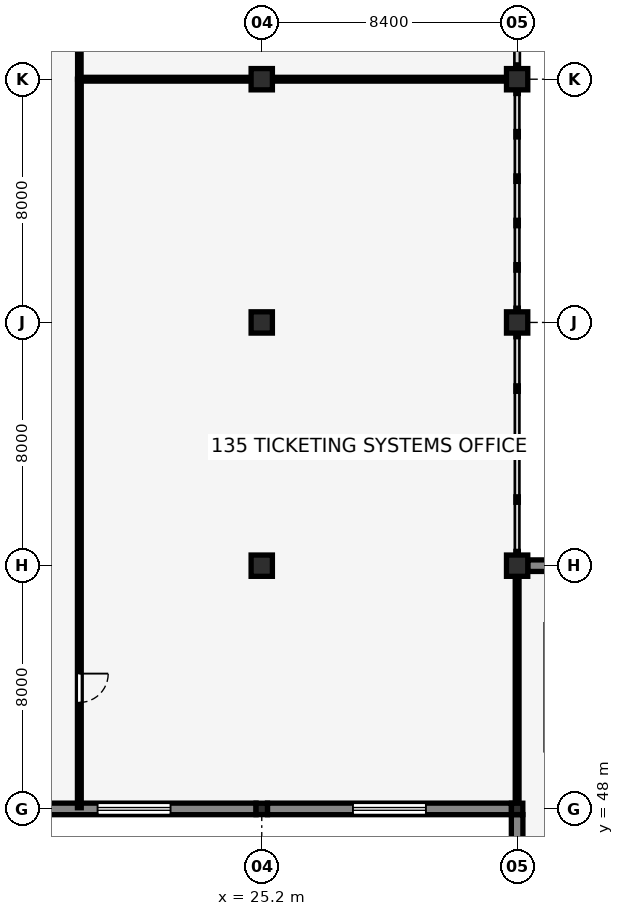
"""IFC4 building model, lengths in metres.
Left out: names, types, materials, properties, quantities, classifications, styles, units other than length and angle.
Written with IfcOpenShell. Run it as: python <this file> out.ifc"""

import sys

from ifc_helpers import new_model, si_unit, direction, frame, frame_2d, origin, origin_2d, place, context, subcontext, project, spatial, rectangle, i_section, extrude, element, fill, save


model = new_model("IFC4")
c1 = context("Model", 3, precision=1e-05, world=origin(), true_north=direction((0.0, 1.0)))
c2 = subcontext(c1, "Body", "Model", "MODEL_VIEW")
j1 = project(units=[si_unit("LENGTHUNIT", "METRE"), si_unit("PLANEANGLEUNIT", "RADIAN")], contexts=[c1])
p1 = place(None, origin())
s1 = spatial("IfcSite", under=j1, at=p1, CompositionType="ELEMENT")
p2 = place(p1, origin())
s2 = spatial("IfcBuilding", under=s1, at=p2, CompositionType="ELEMENT")
p3 = place(p2, frame((0.0, 0.0, 5.44)))
s3 = spatial("IfcBuildingStorey", under=s2, at=p3, CompositionType="ELEMENT", Elevation=5.44)
p4 = place(p3, frame((25.2, 48.0, 0.0), z_axis=(0.0, 0.0, 1.0), x_axis=(1.0, 0.0, 0.0)))
e1 = element("IfcColumn", 1, at=p4, inside=s3, PredefinedType="COLUMN", context=c2, shape_type="SweptSolid", body=[
    extrude(i_section(OverallWidth=0.375, OverallDepth=0.375, WebThickness=0.017, FlangeThickness=0.027, FilletRadius=0.015, at=origin_2d()), origin(), (0.0, 0.0, 1.0), 3.8),
])
for number, where, z_axis, x_axis in (
    (2, (25.2, 56.0, 0.0), (0.0, 0.0, 1.0), (1.0, 0.0, 0.0)),
    (3, (25.2, 64.0, 0.0), (0.0, 0.0, 1.0), (1.0, 0.0, 0.0)),
    (4, (25.2, 72.0, 0.0), (0.0, 0.0, 1.0), (1.0, 0.0, 0.0)),
):
    element("IfcColumn", number, at=place(p3, frame(where, z_axis=z_axis, x_axis=x_axis)), inside=s3, PredefinedType="COLUMN", context=c2, shape_type="SweptSolid", body=[
        extrude(rectangle(XDim=0.7, YDim=0.7, at=origin_2d()), origin(), (0.0, 0.0, 1.0), 3.8),
    ])
p5 = place(p3, frame((33.6, 48.0, 0.0), z_axis=(0.0, 0.0, 1.0), x_axis=(1.0, 0.0, 0.0)))
e5 = element("IfcColumn", 5, at=p5, inside=s3, PredefinedType="COLUMN", context=c2, shape_type="SweptSolid", body=[
    extrude(i_section(OverallWidth=0.375, OverallDepth=0.375, WebThickness=0.017, FlangeThickness=0.027, FilletRadius=0.015, at=origin_2d()), origin(), (0.0, 0.0, 1.0), 3.8),
])
for number, where, z_axis, x_axis in (
    (6, (33.6, 56.0, 0.0), (0.0, 0.0, 1.0), (1.0, 0.0, 0.0)),
    (7, (33.6, 64.0, 0.0), (0.0, 0.0, 1.0), (1.0, 0.0, 0.0)),
    (8, (33.6, 72.0, 0.0), (0.0, 0.0, 1.0), (1.0, 0.0, 0.0)),
):
    element("IfcColumn", number, at=place(p3, frame(where, z_axis=z_axis, x_axis=x_axis)), inside=s3, PredefinedType="COLUMN", context=c2, shape_type="SweptSolid", body=[
        extrude(rectangle(XDim=0.7, YDim=0.7, at=origin_2d()), origin(), (0.0, 0.0, 1.0), 3.8),
    ])
p6 = place(p3, frame((33.6, 40.187, 0.0), z_axis=(0.0, 0.0, 1.0), x_axis=(0.0, 1.0, 0.0)))
e9 = element("IfcWall", 9, at=p6, inside=s3, PredefinedType="SOLIDWALL", context=c2, shape_type="SweptSolid", body=[
    extrude(rectangle(XDim=7.625, YDim=0.38, at=frame_2d((3.813, 0.0))), origin(), (0.0, 0.0, 1.0), 3.442),
])
p7 = place(p6, frame((2.313, 0.0, 0.9), z_axis=(0.0, 0.0, 1.0), x_axis=(1.0, 0.0, 0.0)))
e10 = element("IfcOpeningElement", 10, at=p7, cuts=e9, PredefinedType="OPENING", context=c2, shape_type="SweptSolid", body=[
    extrude(rectangle(XDim=3.0, YDim=1.65, at=frame_2d((1.5, 0.825))), frame((0.0, 0.2, 0.0), z_axis=(0.0, -1.0, 0.0), x_axis=(1.0, 0.0, 0.0)), (0.0, 0.0, 1.0), 0.4),
])
p8 = place(p3, frame((16.987, 48.0, 0.0), z_axis=(0.0, 0.0, 1.0), x_axis=(1.0, 0.0, 0.0)))
e11 = element("IfcWall", 11, at=p8, inside=s3, PredefinedType="SOLIDWALL", context=c2, shape_type="SweptSolid", body=[
    extrude(rectangle(XDim=8.025, YDim=0.38, at=frame_2d((4.013, 0.0))), origin(), (0.0, 0.0, 1.0), 3.45),
])
p9 = place(p8, frame((2.813, 0.0, 0.9), z_axis=(0.0, 0.0, 1.0), x_axis=(1.0, 0.0, 0.0)))
e12 = element("IfcOpeningElement", 12, at=p9, cuts=e11, PredefinedType="OPENING", context=c2, shape_type="SweptSolid", body=[
    extrude(rectangle(XDim=2.4, YDim=1.75, at=frame_2d((1.2, 0.875))), frame((0.0, 0.2, 0.0), z_axis=(0.0, -1.0, 0.0), x_axis=(1.0, 0.0, 0.0)), (0.0, 0.0, 1.0), 0.4),
])
p10 = place(p3, frame((25.387, 48.0, 0.0), z_axis=(0.0, 0.0, 1.0), x_axis=(1.0, 0.0, 0.0)))
e13 = element("IfcWall", 13, at=p10, inside=s3, PredefinedType="SOLIDWALL", context=c2, shape_type="SweptSolid", body=[
    extrude(rectangle(XDim=8.025, YDim=0.38, at=frame_2d((4.013, 0.0))), origin(), (0.0, 0.0, 1.0), 3.45),
])
p11 = place(p10, frame((2.813, 0.0, 0.9), z_axis=(0.0, 0.0, 1.0), x_axis=(1.0, 0.0, 0.0)))
e14 = element("IfcOpeningElement", 14, at=p11, cuts=e13, PredefinedType="OPENING", context=c2, shape_type="SweptSolid", body=[
    extrude(rectangle(XDim=2.4, YDim=1.5, at=frame_2d((1.2, 0.75))), frame((0.0, 0.2, 0.0), z_axis=(0.0, -1.0, 0.0), x_axis=(1.0, 0.0, 0.0)), (0.0, 0.0, 1.0), 0.4),
])
p12 = place(p3, frame((33.95, 56.0, 0.0), z_axis=(0.0, 0.0, 1.0), x_axis=(1.0, 0.0, 0.0)))
e15 = element("IfcWall", 15, at=p12, inside=s3, PredefinedType="SOLIDWALL", context=c2, shape_type="SweptSolid", body=[
    extrude(rectangle(XDim=7.896, YDim=0.38, at=frame_2d((3.948, 0.0))), origin(), (0.0, 0.0, 1.0), 3.45),
])
p13 = place(p3, frame((19.2, 48.04, 0.0), z_axis=(0.0, 0.0, 1.0), x_axis=(0.0, 1.0, 0.0)))
e16 = element("IfcWall", 16, at=p13, inside=s3, PredefinedType="PARTITIONING", context=c2, shape_type="SweptSolid", body=[
    extrude(rectangle(XDim=23.96, YDim=0.125, at=frame_2d((11.98, 0.0))), origin(), (0.0, 0.0, 1.0), 3.8),
])
p14 = place(p13, frame((4.41, 0.0, 0.0), z_axis=(0.0, 0.0, 1.0), x_axis=(-1.0, 0.0, 0.0)))
e17 = element("IfcOpeningElement", 17, at=p14, cuts=e16, PredefinedType="OPENING", context=c2, shape_type="SweptSolid", body=[
    extrude(rectangle(XDim=0.95, YDim=2.15, at=frame_2d((0.475, 1.075))), frame((0.0, 0.073, 0.0), z_axis=(0.0, -1.0, 0.0), x_axis=(1.0, 0.0, 0.0)), (0.0, 0.0, 1.0), 0.145),
])
p15 = place(p3, frame((19.2, 72.0, 0.0), z_axis=(0.0, 0.0, 1.0), x_axis=(0.0, 1.0, 0.0)))
e18 = element("IfcWall", 18, at=p15, inside=s3, PredefinedType="PARTITIONING", context=c2, shape_type="SweptSolid", body=[
    extrude(rectangle(XDim=16.0, YDim=0.115, at=frame_2d((8.0, 0.0))), origin(), (0.0, 0.0, 1.0), 3.8),
])
p16 = place(p15, frame((4.42, 0.0, 0.0), z_axis=(0.0, 0.0, 1.0), x_axis=(-1.0, 0.0, 0.0)))
e19 = element("IfcOpeningElement", 19, at=p16, cuts=e18, PredefinedType="OPENING", context=c2, shape_type="SweptSolid", body=[
    extrude(rectangle(XDim=0.92, YDim=2.12, at=frame_2d((0.46, 1.06))), frame((0.0, 0.067, 0.0), z_axis=(0.0, -1.0, 0.0), x_axis=(1.0, 0.0, 0.0)), (0.0, 0.0, 1.0), 0.135),
])
p17 = place(p3, frame((33.6, 48.177, 0.0), z_axis=(0.0, 0.0, 1.0), x_axis=(0.0, 1.0, 0.0)))
e20 = element("IfcWall", 20, at=p17, inside=s3, PredefinedType="PARTITIONING", context=c2, shape_type="SweptSolid", body=[
    extrude(rectangle(XDim=7.483, YDim=0.125, at=frame_2d((3.741, 0.0))), origin(), (0.0, 0.0, 1.0), 3.337),
])
p18 = place(p3, frame((19.2, 72.0, 0.0), z_axis=(0.0, 0.0, 1.0), x_axis=(1.0, 0.0, 0.0)))
e21 = element("IfcWall", 21, at=p18, inside=s3, PredefinedType="PARTITIONING", context=c2, shape_type="SweptSolid", body=[
    extrude(rectangle(XDim=5.66, YDim=0.125, at=frame_2d((2.83, 0.0))), origin(), (0.0, 0.0, 1.0), 3.26),
])
p19 = place(p3, frame((25.54, 72.0, 0.0), z_axis=(0.0, 0.0, 1.0), x_axis=(1.0, 0.0, 0.0)))
e22 = element("IfcWall", 22, at=p19, inside=s3, PredefinedType="PARTITIONING", context=c2, shape_type="SweptSolid", body=[
    extrude(rectangle(XDim=7.72, YDim=0.125, at=frame_2d((3.86, 0.0))), origin(), (0.0, 0.0, 1.0), 3.26),
])
p20 = place(p9, origin())
e23 = element("IfcWindow", 23, at=p20, inside=s3, PartitioningType="DOUBLE_PANEL_VERTICAL", PredefinedType="WINDOW", context=c2, shape_type="SweptSolid", body=[
    extrude(rectangle(XDim=2.4, YDim=1.75, at=frame_2d((1.2, 0.875))), frame((0.0, 0.03, 0.0), z_axis=(0.0, -1.0, 0.0), x_axis=(1.0, 0.0, 0.0)), (0.0, 0.0, 1.0), 0.06),
])
fill(e12, e23)
p21 = place(p11, origin())
e24 = element("IfcWindow", 24, at=p21, inside=s3, PartitioningType="DOUBLE_PANEL_VERTICAL", PredefinedType="WINDOW", context=c2, shape_type="SweptSolid", body=[
    extrude(rectangle(XDim=2.4, YDim=1.5, at=frame_2d((1.2, 0.75))), frame((0.0, 0.03, 0.0), z_axis=(0.0, -1.0, 0.0), x_axis=(1.0, 0.0, 0.0)), (0.0, 0.0, 1.0), 0.06),
])
fill(e14, e24)
p22 = place(p14, origin())
e25 = element("IfcDoor", 25, at=p22, inside=s3, OperationType="SINGLE_SWING_LEFT", PredefinedType="DOOR", context=c2, shape_type="SweptSolid", body=[
    extrude(rectangle(XDim=0.95, YDim=2.15, at=frame_2d((0.475, 1.075))), frame((0.0, 0.025, 0.0), z_axis=(0.0, -1.0, 0.0), x_axis=(1.0, 0.0, 0.0)), (0.0, 0.0, 1.0), 0.05),
])
fill(e17, e25)
save(model, sys.argv[1])
